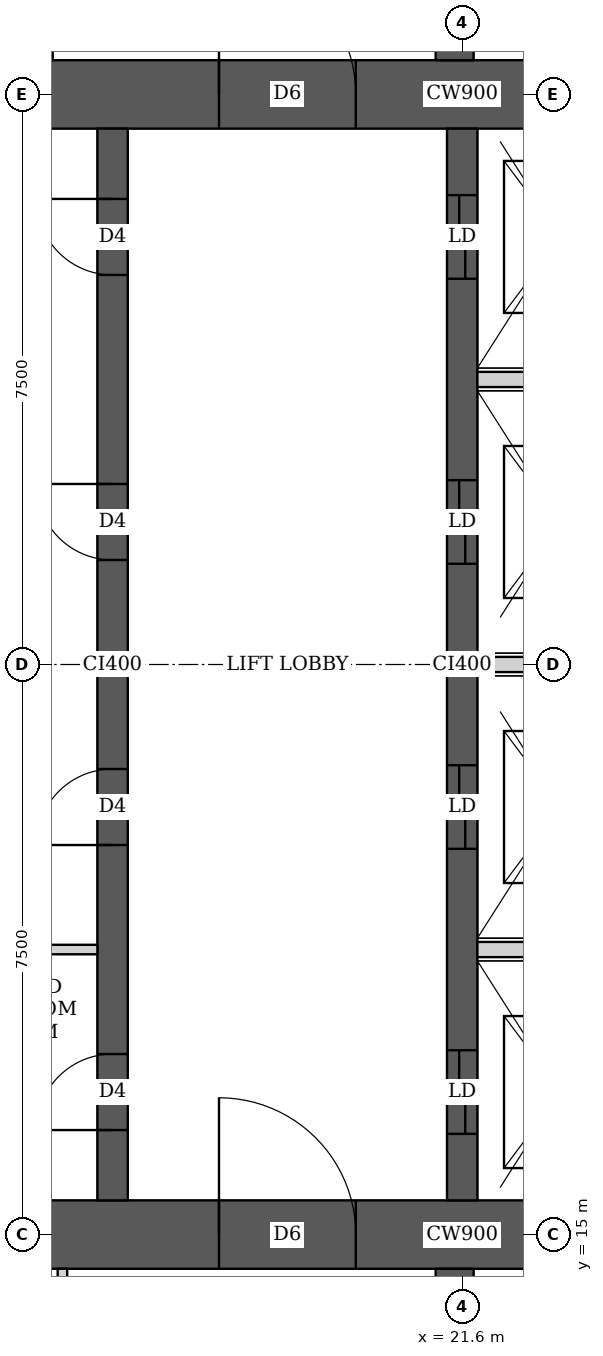
"""IFC4 building model, lengths in metres.
Left out: names, types, materials, properties, quantities, classifications, styles, units other than length and angle.
Written with IfcOpenShell. Run it as: python <this file> out.ifc"""

import sys

from ifc_helpers import new_model, si_unit, direction, frame, frame_2d, origin, place, context, subcontext, project, spatial, rectangle, extrude, element, fill, save


model = new_model("IFC4")
c1 = context("Model", 3, precision=1e-05, world=origin(), true_north=direction((0.0, 1.0)))
c2 = subcontext(c1, "Body", "Model", "MODEL_VIEW")
j1 = project(units=[si_unit("LENGTHUNIT", "METRE"), si_unit("PLANEANGLEUNIT", "RADIAN")], contexts=[c1])
p1 = place(None, origin())
s1 = spatial("IfcSite", under=j1, at=p1, CompositionType="ELEMENT")
p2 = place(p1, origin())
s2 = spatial("IfcBuilding", under=s1, at=p2, CompositionType="ELEMENT")
p3 = place(p2, frame((0.0, 0.0, 188.3)))
s3 = spatial("IfcBuildingStorey", under=s2, at=p3, CompositionType="ELEMENT", Elevation=188.3)
p4 = place(p3, frame((13.95, 15.0, 0.0), z_axis=(0.0, 0.0, 1.0), x_axis=(1.0, 0.0, 0.0)))
e1 = element("IfcWall", 1, at=p4, inside=s3, PredefinedType="SHEAR", context=c2, shape_type="SweptSolid", body=[
    extrude(rectangle(XDim=15.3, YDim=0.9, at=frame_2d((7.65, 0.0))), origin(), (0.0, 0.0, 1.0), 5.4),
])
p5 = place(p4, frame((4.45, 0.0, 0.0)))
e2 = element("IfcOpeningElement", 2, at=p5, cuts=e1, PredefinedType="OPENING", context=c2, shape_type="SweptSolid", body=[
    extrude(rectangle(XDim=1.8, YDim=2.1, at=frame_2d((0.9, 1.05))), frame((0.0, 0.46, 0.0), z_axis=(0.0, -1.0, 0.0), x_axis=(1.0, 0.0, 0.0)), (0.0, 0.0, 1.0), 0.92),
])
p6 = place(p4, frame((10.7, 0.0, 0.0)))
e3 = element("IfcOpeningElement", 3, at=p6, cuts=e1, PredefinedType="OPENING", context=c2, shape_type="SweptSolid", body=[
    extrude(rectangle(XDim=1.1, YDim=2.1, at=frame_2d((0.55, 1.05))), frame((0.0, 0.46, 0.0), z_axis=(0.0, -1.0, 0.0), x_axis=(1.0, 0.0, 0.0)), (0.0, 0.0, 1.0), 0.92),
])
p7 = place(p3, frame((13.95, 30.0, 0.0), z_axis=(0.0, 0.0, 1.0), x_axis=(1.0, 0.0, 0.0)))
e4 = element("IfcWall", 4, at=p7, inside=s3, PredefinedType="SHEAR", context=c2, shape_type="SweptSolid", body=[
    extrude(rectangle(XDim=15.3, YDim=0.9, at=frame_2d((7.65, 0.0))), origin(), (0.0, 0.0, 1.0), 5.4),
])
p8 = place(p7, frame((4.45, 0.0, 0.0)))
e5 = element("IfcOpeningElement", 5, at=p8, cuts=e4, PredefinedType="OPENING", context=c2, shape_type="SweptSolid", body=[
    extrude(rectangle(XDim=1.8, YDim=2.1, at=frame_2d((0.9, 1.05))), frame((0.0, 0.46, 0.0), z_axis=(0.0, -1.0, 0.0), x_axis=(1.0, 0.0, 0.0)), (0.0, 0.0, 1.0), 0.92),
])
p9 = place(p7, frame((10.7, 0.0, 0.0)))
e6 = element("IfcOpeningElement", 6, at=p9, cuts=e4, PredefinedType="OPENING", context=c2, shape_type="SweptSolid", body=[
    extrude(rectangle(XDim=1.1, YDim=2.1, at=frame_2d((0.55, 1.05))), frame((0.0, 0.46, 0.0), z_axis=(0.0, -1.0, 0.0), x_axis=(1.0, 0.0, 0.0)), (0.0, 0.0, 1.0), 0.92),
])
p10 = place(p3, frame((17.0, 15.45, 0.0), z_axis=(0.0, 0.0, 1.0), x_axis=(0.0, 1.0, 0.0)))
e7 = element("IfcWall", 7, at=p10, inside=s3, PredefinedType="SHEAR", context=c2, shape_type="SweptSolid", body=[
    extrude(rectangle(XDim=14.1, YDim=0.4, at=frame_2d((7.05, 0.0))), origin(), (0.0, 0.0, 1.0), 5.4),
])
p11 = place(p10, frame((0.925, 0.0, 0.0)))
e8 = element("IfcOpeningElement", 8, at=p11, cuts=e7, PredefinedType="OPENING", context=c2, shape_type="SweptSolid", body=[
    extrude(rectangle(XDim=1.0, YDim=2.1, at=frame_2d((0.5, 1.05))), frame((0.0, 0.21, 0.0), z_axis=(0.0, -1.0, 0.0), x_axis=(1.0, 0.0, 0.0)), (0.0, 0.0, 1.0), 0.42),
])
p12 = place(p10, frame((4.675, 0.0, 0.0)))
e9 = element("IfcOpeningElement", 9, at=p12, cuts=e7, PredefinedType="OPENING", context=c2, shape_type="SweptSolid", body=[
    extrude(rectangle(XDim=1.0, YDim=2.1, at=frame_2d((0.5, 1.05))), frame((0.0, 0.21, 0.0), z_axis=(0.0, -1.0, 0.0), x_axis=(1.0, 0.0, 0.0)), (0.0, 0.0, 1.0), 0.42),
])
p13 = place(p10, frame((8.425, 0.0, 0.0)))
e10 = element("IfcOpeningElement", 10, at=p13, cuts=e7, PredefinedType="OPENING", context=c2, shape_type="SweptSolid", body=[
    extrude(rectangle(XDim=1.0, YDim=2.1, at=frame_2d((0.5, 1.05))), frame((0.0, 0.21, 0.0), z_axis=(0.0, -1.0, 0.0), x_axis=(1.0, 0.0, 0.0)), (0.0, 0.0, 1.0), 0.42),
])
p14 = place(p10, frame((12.175, 0.0, 0.0)))
e11 = element("IfcOpeningElement", 11, at=p14, cuts=e7, PredefinedType="OPENING", context=c2, shape_type="SweptSolid", body=[
    extrude(rectangle(XDim=1.0, YDim=2.1, at=frame_2d((0.5, 1.05))), frame((0.0, 0.21, 0.0), z_axis=(0.0, -1.0, 0.0), x_axis=(1.0, 0.0, 0.0)), (0.0, 0.0, 1.0), 0.42),
])
p15 = place(p3, frame((21.6, 15.45, 0.0), z_axis=(0.0, 0.0, 1.0), x_axis=(0.0, 1.0, 0.0)))
e12 = element("IfcWall", 12, at=p15, inside=s3, PredefinedType="SHEAR", context=c2, shape_type="SweptSolid", body=[
    extrude(rectangle(XDim=14.1, YDim=0.4, at=frame_2d((7.05, 0.0))), origin(), (0.0, 0.0, 1.0), 5.4),
])
p16 = place(p15, frame((0.875, 0.0, 0.0)))
e13 = element("IfcOpeningElement", 13, at=p16, cuts=e12, PredefinedType="OPENING", context=c2, shape_type="SweptSolid", body=[
    extrude(rectangle(XDim=1.1, YDim=2.1, at=frame_2d((0.55, 1.05))), frame((0.0, 0.21, 0.0), z_axis=(0.0, -1.0, 0.0), x_axis=(1.0, 0.0, 0.0)), (0.0, 0.0, 1.0), 0.42),
])
p17 = place(p15, frame((4.625, 0.0, 0.0)))
e14 = element("IfcOpeningElement", 14, at=p17, cuts=e12, PredefinedType="OPENING", context=c2, shape_type="SweptSolid", body=[
    extrude(rectangle(XDim=1.1, YDim=2.1, at=frame_2d((0.55, 1.05))), frame((0.0, 0.21, 0.0), z_axis=(0.0, -1.0, 0.0), x_axis=(1.0, 0.0, 0.0)), (0.0, 0.0, 1.0), 0.42),
])
p18 = place(p15, frame((8.375, 0.0, 0.0)))
e15 = element("IfcOpeningElement", 15, at=p18, cuts=e12, PredefinedType="OPENING", context=c2, shape_type="SweptSolid", body=[
    extrude(rectangle(XDim=1.1, YDim=2.1, at=frame_2d((0.55, 1.05))), frame((0.0, 0.21, 0.0), z_axis=(0.0, -1.0, 0.0), x_axis=(1.0, 0.0, 0.0)), (0.0, 0.0, 1.0), 0.42),
])
p19 = place(p15, frame((12.125, 0.0, 0.0)))
e16 = element("IfcOpeningElement", 16, at=p19, cuts=e12, PredefinedType="OPENING", context=c2, shape_type="SweptSolid", body=[
    extrude(rectangle(XDim=1.1, YDim=2.1, at=frame_2d((0.55, 1.05))), frame((0.0, 0.21, 0.0), z_axis=(0.0, -1.0, 0.0), x_axis=(1.0, 0.0, 0.0)), (0.0, 0.0, 1.0), 0.42),
])
for number, where, z_axis, x_axis in (
    (17, (21.5, 10.35, 0.0), (0.0, 0.0, 1.0), (0.0, 1.0, 0.0)),
    (18, (21.5, 30.45, 0.0), (0.0, 0.0, 1.0), (0.0, 1.0, 0.0)),
):
    element("IfcWall", number, at=place(p3, frame(where, z_axis=z_axis, x_axis=x_axis)), inside=s3, PredefinedType="SHEAR", context=c2, shape_type="SweptSolid", body=[
        extrude(rectangle(XDim=4.2, YDim=0.5, at=frame_2d((2.1, 0.0))), origin(), (0.0, 0.0, 1.0), 5.4),
    ])
p20 = place(p3, frame((16.34, 10.163, 0.0), z_axis=(0.0, 0.0, 1.0), x_axis=(0.0, 1.0, 0.0)))
e19 = element("IfcWall", 19, at=p20, inside=s3, PredefinedType="PARTITIONING", context=c2, shape_type="SweptSolid", body=[
    extrude(rectangle(XDim=4.387, YDim=0.125, at=frame_2d((2.193, 0.0))), origin(), (0.0, 0.0, 1.0), 5.15),
])
p21 = place(p20, frame((1.637, 0.0, 0.0)))
e20 = element("IfcOpeningElement", 20, at=p21, cuts=e19, PredefinedType="OPENING", context=c2, shape_type="SweptSolid", body=[
    extrude(rectangle(XDim=1.0, YDim=2.1, at=frame_2d((0.5, 1.05))), frame((0.0, 0.073, 0.0), z_axis=(0.0, -1.0, 0.0), x_axis=(1.0, 0.0, 0.0)), (0.0, 0.0, 1.0), 0.145),
])
p22 = place(p3, frame((16.15, 30.45, 0.0), z_axis=(0.0, 0.0, 1.0), x_axis=(0.0, 1.0, 0.0)))
e21 = element("IfcWall", 21, at=p22, inside=s3, PredefinedType="PARTITIONING", context=c2, shape_type="SweptSolid", body=[
    extrude(rectangle(XDim=4.387, YDim=0.125, at=frame_2d((2.193, 0.0))), origin(), (0.0, 0.0, 1.0), 5.15),
])
p23 = place(p22, frame((1.75, 0.0, 0.0)))
e22 = element("IfcOpeningElement", 22, at=p23, cuts=e21, PredefinedType="OPENING", context=c2, shape_type="SweptSolid", body=[
    extrude(rectangle(XDim=1.0, YDim=2.1, at=frame_2d((0.5, 1.05))), frame((0.0, 0.073, 0.0), z_axis=(0.0, -1.0, 0.0), x_axis=(1.0, 0.0, 0.0)), (0.0, 0.0, 1.0), 0.145),
])
p24 = place(p3, frame((14.85, 18.75, 0.0), z_axis=(0.0, 0.0, 1.0), x_axis=(1.0, 0.0, 0.0)))
e23 = element("IfcWall", 23, at=p24, inside=s3, PredefinedType="PARTITIONING", context=c2, shape_type="SweptSolid", body=[
    extrude(rectangle(XDim=1.95, YDim=0.125, at=frame_2d((0.975, 0.0))), origin(), (0.0, 0.0, 1.0), 5.15),
])
for number, where, z_axis, x_axis in (
    (24, (21.8, 18.75, 0.0), (0.0, 0.0, 1.0), (1.0, 0.0, 0.0)),
    (25, (21.8, 22.5, 0.0), (0.0, 0.0, 1.0), (1.0, 0.0, 0.0)),
    (26, (21.8, 26.25, 0.0), (0.0, 0.0, 1.0), (1.0, 0.0, 0.0)),
):
    element("IfcWall", number, at=place(p3, frame(where, z_axis=z_axis, x_axis=x_axis)), inside=s3, PredefinedType="SOLIDWALL", context=c2, shape_type="SweptSolid", body=[
        extrude(rectangle(XDim=2.2, YDim=0.2, at=frame_2d((1.1, 0.0))), origin(), (0.0, 0.0, 1.0), 5.15),
    ])
p25 = place(p11, origin())
e27 = element("IfcDoor", 27, at=p25, inside=s3, OperationType="SINGLE_SWING_LEFT", PredefinedType="DOOR", context=c2, shape_type="SweptSolid", body=[
    extrude(rectangle(XDim=1.0, YDim=2.1, at=frame_2d((0.5, 1.05))), frame((0.0, 0.025, 0.0), z_axis=(0.0, -1.0, 0.0), x_axis=(1.0, 0.0, 0.0)), (0.0, 0.0, 1.0), 0.05),
])
fill(e8, e27)
p26 = place(p12, origin())
e28 = element("IfcDoor", 28, at=p26, inside=s3, OperationType="SINGLE_SWING_LEFT", PredefinedType="DOOR", context=c2, shape_type="SweptSolid", body=[
    extrude(rectangle(XDim=1.0, YDim=2.1, at=frame_2d((0.5, 1.05))), frame((0.0, 0.025, 0.0), z_axis=(0.0, -1.0, 0.0), x_axis=(1.0, 0.0, 0.0)), (0.0, 0.0, 1.0), 0.05),
])
fill(e9, e28)
p27 = place(p13, origin())
e29 = element("IfcDoor", 29, at=p27, inside=s3, OperationType="SINGLE_SWING_RIGHT", PredefinedType="DOOR", context=c2, shape_type="SweptSolid", body=[
    extrude(rectangle(XDim=1.0, YDim=2.1, at=frame_2d((0.5, 1.05))), frame((0.0, 0.025, 0.0), z_axis=(0.0, -1.0, 0.0), x_axis=(1.0, 0.0, 0.0)), (0.0, 0.0, 1.0), 0.05),
])
fill(e10, e29)
p28 = place(p14, origin())
e30 = element("IfcDoor", 30, at=p28, inside=s3, OperationType="SINGLE_SWING_RIGHT", PredefinedType="DOOR", context=c2, shape_type="SweptSolid", body=[
    extrude(rectangle(XDim=1.0, YDim=2.1, at=frame_2d((0.5, 1.05))), frame((0.0, 0.025, 0.0), z_axis=(0.0, -1.0, 0.0), x_axis=(1.0, 0.0, 0.0)), (0.0, 0.0, 1.0), 0.05),
])
fill(e11, e30)
p29 = place(p5, origin())
e31 = element("IfcDoor", 31, at=p29, inside=s3, OperationType="DOUBLE_DOOR_SINGLE_SWING", PredefinedType="DOOR", context=c2, shape_type="SweptSolid", body=[
    extrude(rectangle(XDim=1.8, YDim=2.1, at=frame_2d((0.9, 1.05))), frame((0.0, 0.025, 0.0), z_axis=(0.0, -1.0, 0.0), x_axis=(1.0, 0.0, 0.0)), (0.0, 0.0, 1.0), 0.05),
])
fill(e2, e31)
p30 = place(p8, origin())
e32 = element("IfcDoor", 32, at=p30, inside=s3, OperationType="DOUBLE_DOOR_SINGLE_SWING", PredefinedType="DOOR", context=c2, shape_type="SweptSolid", body=[
    extrude(rectangle(XDim=1.8, YDim=2.1, at=frame_2d((0.9, 1.05))), frame((0.0, 0.025, 0.0), z_axis=(0.0, -1.0, 0.0), x_axis=(1.0, 0.0, 0.0)), (0.0, 0.0, 1.0), 0.05),
])
fill(e5, e32)
p31 = place(p16, origin())
e33 = element("IfcDoor", 33, at=p31, inside=s3, OperationType="DOUBLE_DOOR_SLIDING", PredefinedType="DOOR", context=c2, shape_type="SweptSolid", body=[
    extrude(rectangle(XDim=1.1, YDim=2.1, at=frame_2d((0.55, 1.05))), frame((0.0, 0.025, 0.0), z_axis=(0.0, -1.0, 0.0), x_axis=(1.0, 0.0, 0.0)), (0.0, 0.0, 1.0), 0.05),
])
fill(e13, e33)
p32 = place(p17, origin())
e34 = element("IfcDoor", 34, at=p32, inside=s3, OperationType="DOUBLE_DOOR_SLIDING", PredefinedType="DOOR", context=c2, shape_type="SweptSolid", body=[
    extrude(rectangle(XDim=1.1, YDim=2.1, at=frame_2d((0.55, 1.05))), frame((0.0, 0.025, 0.0), z_axis=(0.0, -1.0, 0.0), x_axis=(1.0, 0.0, 0.0)), (0.0, 0.0, 1.0), 0.05),
])
fill(e14, e34)
p33 = place(p18, origin())
e35 = element("IfcDoor", 35, at=p33, inside=s3, OperationType="DOUBLE_DOOR_SLIDING", PredefinedType="DOOR", context=c2, shape_type="SweptSolid", body=[
    extrude(rectangle(XDim=1.1, YDim=2.1, at=frame_2d((0.55, 1.05))), frame((0.0, 0.025, 0.0), z_axis=(0.0, -1.0, 0.0), x_axis=(1.0, 0.0, 0.0)), (0.0, 0.0, 1.0), 0.05),
])
fill(e15, e35)
p34 = place(p19, origin())
e36 = element("IfcDoor", 36, at=p34, inside=s3, OperationType="DOUBLE_DOOR_SLIDING", PredefinedType="DOOR", context=c2, shape_type="SweptSolid", body=[
    extrude(rectangle(XDim=1.1, YDim=2.1, at=frame_2d((0.55, 1.05))), frame((0.0, 0.025, 0.0), z_axis=(0.0, -1.0, 0.0), x_axis=(1.0, 0.0, 0.0)), (0.0, 0.0, 1.0), 0.05),
])
fill(e16, e36)
save(model, sys.argv[1])
